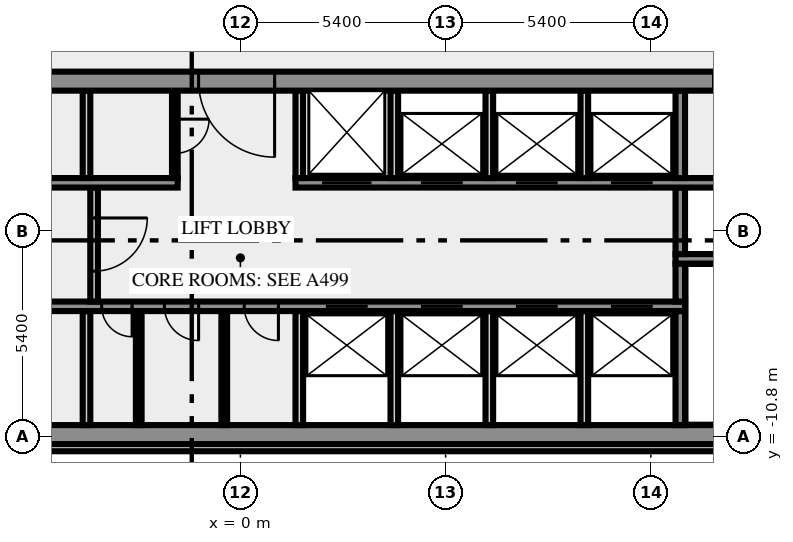
"""IFC4 building model, lengths in metres.
Left out: names, types, materials, properties, quantities, classifications, styles, units other than length and angle.
Written with IfcOpenShell. Run it as: python <this file> out.ifc"""

import sys

from ifc_helpers import new_model, si_unit, direction, frame, frame_2d, origin, place, context, subcontext, project, spatial, rectangle, extrude, element, fill, save


model = new_model("IFC4")
c1 = context("Model", 3, precision=1e-05, world=origin(), true_north=direction((0.0, 1.0)))
c2 = subcontext(c1, "Body", "Model", "MODEL_VIEW")
j1 = project(units=[si_unit("LENGTHUNIT", "METRE"), si_unit("PLANEANGLEUNIT", "RADIAN")], contexts=[c1])
p1 = place(None, origin())
s1 = spatial("IfcSite", under=j1, at=p1, CompositionType="ELEMENT")
p2 = place(p1, origin())
s2 = spatial("IfcBuilding", under=s1, at=p2, CompositionType="ELEMENT")
p3 = place(p2, frame((0.0, 0.0, 230.0)))
s3 = spatial("IfcBuildingStorey", under=s2, at=p3, CompositionType="ELEMENT", Elevation=230.0)
p4 = place(p3, frame((-17.444, -11.088, 0.0), z_axis=(0.0, 0.0, 1.0), x_axis=(1.0, 0.0, 0.0)))
e1 = element("IfcWall", 1, at=p4, inside=s3, PredefinedType="SOLIDWALL", context=c2, shape_type="SweptSolid", body=[
    extrude(rectangle(XDim=34.888, YDim=0.2, at=frame_2d((17.444, 0.0))), origin(), (0.0, 0.0, 1.0), 3.65),
])
p5 = place(p3, frame((-20.0, -10.75, 0.0), z_axis=(0.0, 0.0, 1.0), x_axis=(1.0, 0.0, 0.0)))
e2 = element("IfcWall", 2, at=p5, inside=s3, PredefinedType="SHEAR", context=c2, shape_type="SweptSolid", body=[
    extrude(rectangle(XDim=40.0, YDim=0.5, at=frame_2d((20.0, 0.0))), origin(), (0.0, 0.0, 1.0), 3.65),
])
p6 = place(p5, frame((0.8, 0.0, 1.0)))
e3 = element("IfcOpeningElement", 3, at=p6, cuts=e2, PredefinedType="OPENING", context=c2, shape_type="SweptSolid", body=[
    extrude(rectangle(XDim=1.2, YDim=1.2, at=frame_2d((0.6, 0.6))), frame((0.0, 0.26, 0.0), z_axis=(0.0, -1.0, 0.0), x_axis=(1.0, 0.0, 0.0)), (0.0, 0.0, 1.0), 0.52),
])
p7 = place(p5, frame((38.0, 0.0, 1.0)))
e4 = element("IfcOpeningElement", 4, at=p7, cuts=e2, PredefinedType="OPENING", context=c2, shape_type="SweptSolid", body=[
    extrude(rectangle(XDim=1.2, YDim=1.2, at=frame_2d((0.6, 0.6))), frame((0.0, 0.26, 0.0), z_axis=(0.0, -1.0, 0.0), x_axis=(1.0, 0.0, 0.0)), (0.0, 0.0, 1.0), 0.52),
])
p8 = place(p3, frame((-4.05, -10.5, 0.0), z_axis=(0.0, 0.0, 1.0), x_axis=(0.0, 1.0, 0.0)))
e5 = element("IfcWall", 5, at=p8, inside=s3, PredefinedType="SOLIDWALL", context=c2, shape_type="SweptSolid", body=[
    extrude(rectangle(XDim=3.0, YDim=0.2, at=frame_2d((1.5, 0.0))), origin(), (0.0, 0.0, 1.0), 3.65),
])
for number, where, z_axis, x_axis in (
    (6, (-2.675, -10.5, 0.0), (0.0, 0.0, 1.0), (0.0, 1.0, 0.0)),
    (7, (-0.425, -10.5, 0.0), (0.0, 0.0, 1.0), (0.0, 1.0, 0.0)),
):
    element("IfcWall", number, at=place(p3, frame(where, z_axis=z_axis, x_axis=x_axis)), inside=s3, PredefinedType="PARTITIONING", context=c2, shape_type="SweptSolid", body=[
        extrude(rectangle(XDim=3.0, YDim=0.15, at=frame_2d((1.5, 0.0))), origin(), (0.0, 0.0, 1.0), 3.65),
    ])
for number, where, z_axis, x_axis in (
    (8, (1.55, -10.5, 0.0), (0.0, 0.0, 1.0), (0.0, 1.0, 0.0)),
    (9, (4.05, -10.5, 0.0), (0.0, 0.0, 1.0), (0.0, 1.0, 0.0)),
    (10, (6.55, -10.5, 0.0), (0.0, 0.0, 1.0), (0.0, 1.0, 0.0)),
    (11, (9.05, -10.5, 0.0), (0.0, 0.0, 1.0), (0.0, 1.0, 0.0)),
):
    element("IfcWall", number, at=place(p3, frame(where, z_axis=z_axis, x_axis=x_axis)), inside=s3, PredefinedType="SOLIDWALL", context=c2, shape_type="SweptSolid", body=[
        extrude(rectangle(XDim=3.0, YDim=0.2, at=frame_2d((1.5, 0.0))), origin(), (0.0, 0.0, 1.0), 3.65),
    ])
p9 = place(p3, frame((11.575, -10.5, 0.0), z_axis=(0.0, 0.0, 1.0), x_axis=(0.0, 1.0, 0.0)))
e12 = element("IfcWall", 12, at=p9, inside=s3, PredefinedType="SHEAR", context=c2, shape_type="SweptSolid", body=[
    extrude(rectangle(XDim=3.0, YDim=0.25, at=frame_2d((1.5, 0.0))), origin(), (0.0, 0.0, 1.0), 3.65),
])
p10 = place(p3, frame((11.7, -7.375, 0.0), z_axis=(0.0, 0.0, 1.0), x_axis=(-1.0, 0.0, 0.0)))
e13 = element("IfcWall", 13, at=p10, inside=s3, PredefinedType="SHEAR", context=c2, shape_type="SweptSolid", body=[
    extrude(rectangle(XDim=23.4, YDim=0.25, at=frame_2d((11.7, 0.0))), origin(), (0.0, 0.0, 1.0), 3.65),
])
p11 = place(p10, frame((19.05, 0.0, 0.0)))
e14 = element("IfcOpeningElement", 14, at=p11, cuts=e13, PredefinedType="OPENING", context=c2, shape_type="SweptSolid", body=[
    extrude(rectangle(XDim=0.9, YDim=2.1, at=frame_2d((0.45, 1.05))), frame((0.0, 0.135, 0.0), z_axis=(0.0, -1.0, 0.0), x_axis=(1.0, 0.0, 0.0)), (0.0, 0.0, 1.0), 0.27),
])
p12 = place(p10, frame((14.55, 0.0, 0.0)))
e15 = element("IfcOpeningElement", 15, at=p12, cuts=e13, PredefinedType="OPENING", context=c2, shape_type="SweptSolid", body=[
    extrude(rectangle(XDim=0.8, YDim=2.1, at=frame_2d((0.4, 1.05))), frame((0.0, 0.135, 0.0), z_axis=(0.0, -1.0, 0.0), x_axis=(1.0, 0.0, 0.0)), (0.0, 0.0, 1.0), 0.27),
])
p13 = place(p10, frame((12.8, 0.0, 0.0)))
e16 = element("IfcOpeningElement", 16, at=p13, cuts=e13, PredefinedType="OPENING", context=c2, shape_type="SweptSolid", body=[
    extrude(rectangle(XDim=0.9, YDim=2.1, at=frame_2d((0.45, 1.05))), frame((0.0, 0.135, 0.0), z_axis=(0.0, -1.0, 0.0), x_axis=(1.0, 0.0, 0.0)), (0.0, 0.0, 1.0), 0.27),
])
p14 = place(p10, frame((10.7, 0.0, 0.0)))
e17 = element("IfcOpeningElement", 17, at=p14, cuts=e13, PredefinedType="OPENING", context=c2, shape_type="SweptSolid", body=[
    extrude(rectangle(XDim=0.9, YDim=2.1, at=frame_2d((0.45, 1.05))), frame((0.0, 0.135, 0.0), z_axis=(0.0, -1.0, 0.0), x_axis=(1.0, 0.0, 0.0)), (0.0, 0.0, 1.0), 0.27),
])
p15 = place(p10, frame((8.35, 0.0, 0.0)))
e18 = element("IfcOpeningElement", 18, at=p15, cuts=e13, PredefinedType="OPENING", context=c2, shape_type="SweptSolid", body=[
    extrude(rectangle(XDim=1.1, YDim=2.1, at=frame_2d((0.55, 1.05))), frame((0.0, 0.135, 0.0), z_axis=(0.0, -1.0, 0.0), x_axis=(1.0, 0.0, 0.0)), (0.0, 0.0, 1.0), 0.27),
])
p16 = place(p10, frame((5.85, 0.0, 0.0)))
e19 = element("IfcOpeningElement", 19, at=p16, cuts=e13, PredefinedType="OPENING", context=c2, shape_type="SweptSolid", body=[
    extrude(rectangle(XDim=1.1, YDim=2.1, at=frame_2d((0.55, 1.05))), frame((0.0, 0.135, 0.0), z_axis=(0.0, -1.0, 0.0), x_axis=(1.0, 0.0, 0.0)), (0.0, 0.0, 1.0), 0.27),
])
p17 = place(p10, frame((3.35, 0.0, 0.0)))
e20 = element("IfcOpeningElement", 20, at=p17, cuts=e13, PredefinedType="OPENING", context=c2, shape_type="SweptSolid", body=[
    extrude(rectangle(XDim=1.1, YDim=2.1, at=frame_2d((0.55, 1.05))), frame((0.0, 0.135, 0.0), z_axis=(0.0, -1.0, 0.0), x_axis=(1.0, 0.0, 0.0)), (0.0, 0.0, 1.0), 0.27),
])
p18 = place(p10, frame((0.85, 0.0, 0.0)))
e21 = element("IfcOpeningElement", 21, at=p18, cuts=e13, PredefinedType="OPENING", context=c2, shape_type="SweptSolid", body=[
    extrude(rectangle(XDim=1.1, YDim=2.1, at=frame_2d((0.55, 1.05))), frame((0.0, 0.135, 0.0), z_axis=(0.0, -1.0, 0.0), x_axis=(1.0, 0.0, 0.0)), (0.0, 0.0, 1.0), 0.27),
])
p19 = place(p3, frame((-3.85, -4.25, 0.0), z_axis=(0.0, 0.0, 1.0), x_axis=(0.0, -1.0, 0.0)))
e22 = element("IfcWall", 22, at=p19, inside=s3, PredefinedType="SOLIDWALL", context=c2, shape_type="SweptSolid", body=[
    extrude(rectangle(XDim=3.0, YDim=0.2, at=frame_2d((1.5, 0.0))), origin(), (0.0, 0.0, 1.0), 3.65),
])
p20 = place(p19, frame((0.8, 0.0, 0.0)))
e23 = element("IfcOpeningElement", 23, at=p20, cuts=e22, PredefinedType="OPENING", context=c2, shape_type="SweptSolid", body=[
    extrude(rectangle(XDim=1.4, YDim=2.1, at=frame_2d((0.7, 1.05))), frame((0.0, 0.11, 0.0), z_axis=(0.0, -1.0, 0.0), x_axis=(1.0, 0.0, 0.0)), (0.0, 0.0, 1.0), 0.22),
])
p21 = place(p3, frame((11.575, -7.25, 0.0), z_axis=(0.0, 0.0, 1.0), x_axis=(0.0, 1.0, 0.0)))
e24 = element("IfcWall", 24, at=p21, inside=s3, PredefinedType="SHEAR", context=c2, shape_type="SweptSolid", body=[
    extrude(rectangle(XDim=1.0, YDim=0.25, at=frame_2d((0.5, 0.0))), origin(), (0.0, 0.0, 1.0), 3.65),
])
p22 = place(p3, frame((19.5, -6.125, 0.0), z_axis=(0.0, 0.0, 1.0), x_axis=(-1.0, 0.0, 0.0)))
e25 = element("IfcWall", 25, at=p22, inside=s3, PredefinedType="SHEAR", context=c2, shape_type="SweptSolid", body=[
    extrude(rectangle(XDim=8.05, YDim=0.25, at=frame_2d((4.025, 0.0))), origin(), (0.0, 0.0, 1.0), 3.65),
])
p23 = place(p22, frame((0.05, 0.0, 0.0)))
e26 = element("IfcOpeningElement", 26, at=p23, cuts=e25, PredefinedType="OPENING", context=c2, shape_type="SweptSolid", body=[
    extrude(rectangle(XDim=1.8, YDim=2.1, at=frame_2d((0.9, 1.05))), frame((0.0, 0.135, 0.0), z_axis=(0.0, -1.0, 0.0), x_axis=(1.0, 0.0, 0.0)), (0.0, 0.0, 1.0), 0.27),
])
p24 = place(p3, frame((11.575, -6.0, 0.0), z_axis=(0.0, 0.0, 1.0), x_axis=(0.0, 1.0, 0.0)))
e27 = element("IfcWall", 27, at=p24, inside=s3, PredefinedType="SHEAR", context=c2, shape_type="SweptSolid", body=[
    extrude(rectangle(XDim=1.75, YDim=0.25, at=frame_2d((0.875, 0.0))), origin(), (0.0, 0.0, 1.0), 3.65),
])
p25 = place(p3, frame((-14.35, -4.125, 0.0), z_axis=(0.0, 0.0, 1.0), x_axis=(1.0, 0.0, 0.0)))
e28 = element("IfcWall", 28, at=p25, inside=s3, PredefinedType="SHEAR", context=c2, shape_type="SweptSolid", body=[
    extrude(rectangle(XDim=12.7, YDim=0.25, at=frame_2d((6.35, 0.0))), origin(), (0.0, 0.0, 1.0), 3.65),
])
p26 = place(p3, frame((1.45, -4.125, 0.0), z_axis=(0.0, 0.0, 1.0), x_axis=(1.0, 0.0, 0.0)))
e29 = element("IfcWall", 29, at=p26, inside=s3, PredefinedType="SHEAR", context=c2, shape_type="SweptSolid", body=[
    extrude(rectangle(XDim=12.9, YDim=0.25, at=frame_2d((6.45, 0.0))), origin(), (0.0, 0.0, 1.0), 3.65),
])
p27 = place(p26, frame((0.7, 0.0, 0.0)))
e30 = element("IfcOpeningElement", 30, at=p27, cuts=e29, PredefinedType="OPENING", context=c2, shape_type="SweptSolid", body=[
    extrude(rectangle(XDim=1.3, YDim=2.1, at=frame_2d((0.65, 1.05))), frame((0.0, 0.135, 0.0), z_axis=(0.0, -1.0, 0.0), x_axis=(1.0, 0.0, 0.0)), (0.0, 0.0, 1.0), 0.27),
])
p28 = place(p26, frame((3.3, 0.0, 0.0)))
e31 = element("IfcOpeningElement", 31, at=p28, cuts=e29, PredefinedType="OPENING", context=c2, shape_type="SweptSolid", body=[
    extrude(rectangle(XDim=1.1, YDim=2.1, at=frame_2d((0.55, 1.05))), frame((0.0, 0.135, 0.0), z_axis=(0.0, -1.0, 0.0), x_axis=(1.0, 0.0, 0.0)), (0.0, 0.0, 1.0), 0.27),
])
p29 = place(p26, frame((5.8, 0.0, 0.0)))
e32 = element("IfcOpeningElement", 32, at=p29, cuts=e29, PredefinedType="OPENING", context=c2, shape_type="SweptSolid", body=[
    extrude(rectangle(XDim=1.1, YDim=2.1, at=frame_2d((0.55, 1.05))), frame((0.0, 0.135, 0.0), z_axis=(0.0, -1.0, 0.0), x_axis=(1.0, 0.0, 0.0)), (0.0, 0.0, 1.0), 0.27),
])
p30 = place(p26, frame((8.3, 0.0, 0.0)))
e33 = element("IfcOpeningElement", 33, at=p30, cuts=e29, PredefinedType="OPENING", context=c2, shape_type="SweptSolid", body=[
    extrude(rectangle(XDim=1.1, YDim=2.1, at=frame_2d((0.55, 1.05))), frame((0.0, 0.135, 0.0), z_axis=(0.0, -1.0, 0.0), x_axis=(1.0, 0.0, 0.0)), (0.0, 0.0, 1.0), 0.27),
])
p31 = place(p3, frame((-4.05, -4.0, 0.0), z_axis=(0.0, 0.0, 1.0), x_axis=(0.0, 1.0, 0.0)))
e34 = element("IfcWall", 34, at=p31, inside=s3, PredefinedType="SOLIDWALL", context=c2, shape_type="SweptSolid", body=[
    extrude(rectangle(XDim=2.3, YDim=0.2, at=frame_2d((1.15, 0.0))), origin(), (0.0, 0.0, 1.0), 3.65),
])
p32 = place(p3, frame((-1.725, -1.7, 0.0), z_axis=(0.0, 0.0, 1.0), x_axis=(0.0, -1.0, 0.0)))
e35 = element("IfcWall", 35, at=p32, inside=s3, PredefinedType="PARTITIONING", context=c2, shape_type="SweptSolid", body=[
    extrude(rectangle(XDim=2.3, YDim=0.15, at=frame_2d((1.15, 0.0))), origin(), (0.0, 0.0, 1.0), 3.65),
])
p33 = place(p32, frame((0.75, 0.0, 0.0)))
e36 = element("IfcOpeningElement", 36, at=p33, cuts=e35, PredefinedType="OPENING", context=c2, shape_type="SweptSolid", body=[
    extrude(rectangle(XDim=0.9, YDim=2.1, at=frame_2d((0.45, 1.05))), frame((0.0, 0.085, 0.0), z_axis=(0.0, -1.0, 0.0), x_axis=(1.0, 0.0, 0.0)), (0.0, 0.0, 1.0), 0.17),
])
for number, where, z_axis, x_axis in (
    (37, (1.55, -4.0, 0.0), (0.0, 0.0, 1.0), (0.0, 1.0, 0.0)),
    (38, (4.05, -4.0, 0.0), (0.0, 0.0, 1.0), (0.0, 1.0, 0.0)),
    (39, (6.55, -4.0, 0.0), (0.0, 0.0, 1.0), (0.0, 1.0, 0.0)),
    (40, (9.05, -4.0, 0.0), (0.0, 0.0, 1.0), (0.0, 1.0, 0.0)),
):
    element("IfcWall", number, at=place(p3, frame(where, z_axis=z_axis, x_axis=x_axis)), inside=s3, PredefinedType="SOLIDWALL", context=c2, shape_type="SweptSolid", body=[
        extrude(rectangle(XDim=2.3, YDim=0.2, at=frame_2d((1.15, 0.0))), origin(), (0.0, 0.0, 1.0), 3.65),
    ])
p34 = place(p3, frame((11.575, -4.0, 0.0), z_axis=(0.0, 0.0, 1.0), x_axis=(0.0, 1.0, 0.0)))
e41 = element("IfcWall", 41, at=p34, inside=s3, PredefinedType="SHEAR", context=c2, shape_type="SweptSolid", body=[
    extrude(rectangle(XDim=2.3, YDim=0.25, at=frame_2d((1.15, 0.0))), origin(), (0.0, 0.0, 1.0), 3.65),
])
p35 = place(p3, frame((20.49, -1.45, 0.0), z_axis=(0.0, 0.0, 1.0), x_axis=(-1.0, 0.0, 0.0)))
e42 = element("IfcWall", 42, at=p35, inside=s3, PredefinedType="SHEAR", context=c2, shape_type="SweptSolid", body=[
    extrude(rectangle(XDim=40.98, YDim=0.5, at=frame_2d((20.49, 0.0))), origin(), (0.0, 0.0, 1.0), 3.65),
])
p36 = place(p35, frame((38.14, 0.0, 0.0)))
e43 = element("IfcOpeningElement", 43, at=p36, cuts=e42, PredefinedType="OPENING", context=c2, shape_type="SweptSolid", body=[
    extrude(rectangle(XDim=1.8, YDim=2.1, at=frame_2d((0.9, 1.05))), frame((0.0, 0.26, 0.0), z_axis=(0.0, -1.0, 0.0), x_axis=(1.0, 0.0, 0.0)), (0.0, 0.0, 1.0), 0.52),
])
p37 = place(p35, frame((36.728, 0.0, 0.0)))
e44 = element("IfcOpeningElement", 44, at=p37, cuts=e42, PredefinedType="OPENING", context=c2, shape_type="SweptSolid", body=[
    extrude(rectangle(XDim=0.8, YDim=2.1, at=frame_2d((0.4, 1.05))), frame((0.0, 0.26, 0.0), z_axis=(0.0, -1.0, 0.0), x_axis=(1.0, 0.0, 0.0)), (0.0, 0.0, 1.0), 0.52),
])
p38 = place(p35, frame((35.153, 0.0, 0.0)))
e45 = element("IfcOpeningElement", 45, at=p38, cuts=e42, PredefinedType="OPENING", context=c2, shape_type="SweptSolid", body=[
    extrude(rectangle(XDim=0.8, YDim=2.1, at=frame_2d((0.4, 1.05))), frame((0.0, 0.26, 0.0), z_axis=(0.0, -1.0, 0.0), x_axis=(1.0, 0.0, 0.0)), (0.0, 0.0, 1.0), 0.52),
])
p39 = place(p35, frame((32.94, 0.0, 0.0)))
e46 = element("IfcOpeningElement", 46, at=p39, cuts=e42, PredefinedType="OPENING", context=c2, shape_type="SweptSolid", body=[
    extrude(rectangle(XDim=0.9, YDim=2.1, at=frame_2d((0.45, 1.05))), frame((0.0, 0.26, 0.0), z_axis=(0.0, -1.0, 0.0), x_axis=(1.0, 0.0, 0.0)), (0.0, 0.0, 1.0), 0.52),
])
p40 = place(p35, frame((29.603, 0.0, 0.0)))
e47 = element("IfcOpeningElement", 47, at=p40, cuts=e42, PredefinedType="OPENING", context=c2, shape_type="SweptSolid", body=[
    extrude(rectangle(XDim=0.9, YDim=2.1, at=frame_2d((0.45, 1.05))), frame((0.0, 0.26, 0.0), z_axis=(0.0, -1.0, 0.0), x_axis=(1.0, 0.0, 0.0)), (0.0, 0.0, 1.0), 0.52),
])
p41 = place(p35, frame((25.877, 0.0, 0.0)))
e48 = element("IfcOpeningElement", 48, at=p41, cuts=e42, PredefinedType="OPENING", context=c2, shape_type="SweptSolid", body=[
    extrude(rectangle(XDim=0.9, YDim=2.1, at=frame_2d((0.45, 1.05))), frame((0.0, 0.26, 0.0), z_axis=(0.0, -1.0, 0.0), x_axis=(1.0, 0.0, 0.0)), (0.0, 0.0, 1.0), 0.52),
])
p42 = place(p35, frame((19.59, 0.0, 0.0)))
e49 = element("IfcOpeningElement", 49, at=p42, cuts=e42, PredefinedType="OPENING", context=c2, shape_type="SweptSolid", body=[
    extrude(rectangle(XDim=2.0, YDim=2.1, at=frame_2d((1.0, 1.05))), frame((0.0, 0.26, 0.0), z_axis=(0.0, -1.0, 0.0), x_axis=(1.0, 0.0, 0.0)), (0.0, 0.0, 1.0), 0.52),
])
p43 = place(p35, frame((7.14, 0.0, 0.0)))
e50 = element("IfcOpeningElement", 50, at=p43, cuts=e42, PredefinedType="OPENING", context=c2, shape_type="SweptSolid", body=[
    extrude(rectangle(XDim=0.9, YDim=2.1, at=frame_2d((0.45, 1.05))), frame((0.0, 0.26, 0.0), z_axis=(0.0, -1.0, 0.0), x_axis=(1.0, 0.0, 0.0)), (0.0, 0.0, 1.0), 0.52),
])
p44 = place(p35, frame((4.19, 0.0, 0.0)))
e51 = element("IfcOpeningElement", 51, at=p44, cuts=e42, PredefinedType="OPENING", context=c2, shape_type="SweptSolid", body=[
    extrude(rectangle(XDim=0.9, YDim=2.1, at=frame_2d((0.45, 1.05))), frame((0.0, 0.26, 0.0), z_axis=(0.0, -1.0, 0.0), x_axis=(1.0, 0.0, 0.0)), (0.0, 0.0, 1.0), 0.52),
])
p45 = place(p35, frame((1.04, 0.0, 0.0)))
e52 = element("IfcOpeningElement", 52, at=p45, cuts=e42, PredefinedType="OPENING", context=c2, shape_type="SweptSolid", body=[
    extrude(rectangle(XDim=1.8, YDim=2.1, at=frame_2d((0.9, 1.05))), frame((0.0, 0.26, 0.0), z_axis=(0.0, -1.0, 0.0), x_axis=(1.0, 0.0, 0.0)), (0.0, 0.0, 1.0), 0.52),
])
p46 = place(p12, origin())
e53 = element("IfcDoor", 53, at=p46, inside=s3, OperationType="SINGLE_SWING_RIGHT", PredefinedType="DOOR", context=c2, shape_type="SweptSolid", body=[
    extrude(rectangle(XDim=0.8, YDim=2.1, at=frame_2d((0.4, 1.05))), frame((0.0, 0.025, 0.0), z_axis=(0.0, -1.0, 0.0), x_axis=(1.0, 0.0, 0.0)), (0.0, 0.0, 1.0), 0.05),
])
fill(e15, e53)
p47 = place(p13, origin())
e54 = element("IfcDoor", 54, at=p47, inside=s3, OperationType="SINGLE_SWING_RIGHT", PredefinedType="DOOR", context=c2, shape_type="SweptSolid", body=[
    extrude(rectangle(XDim=0.9, YDim=2.1, at=frame_2d((0.45, 1.05))), frame((0.0, 0.025, 0.0), z_axis=(0.0, -1.0, 0.0), x_axis=(1.0, 0.0, 0.0)), (0.0, 0.0, 1.0), 0.05),
])
fill(e16, e54)
p48 = place(p14, origin())
e55 = element("IfcDoor", 55, at=p48, inside=s3, OperationType="SINGLE_SWING_LEFT", PredefinedType="DOOR", context=c2, shape_type="SweptSolid", body=[
    extrude(rectangle(XDim=0.9, YDim=2.1, at=frame_2d((0.45, 1.05))), frame((0.0, 0.025, 0.0), z_axis=(0.0, -1.0, 0.0), x_axis=(1.0, 0.0, 0.0)), (0.0, 0.0, 1.0), 0.05),
])
fill(e17, e55)
p49 = place(p15, origin())
e56 = element("IfcDoor", 56, at=p49, inside=s3, OperationType="DOUBLE_DOOR_SLIDING", PredefinedType="DOOR", context=c2, shape_type="SweptSolid", body=[
    extrude(rectangle(XDim=1.1, YDim=2.1, at=frame_2d((0.55, 1.05))), frame((0.0, 0.025, 0.0), z_axis=(0.0, -1.0, 0.0), x_axis=(1.0, 0.0, 0.0)), (0.0, 0.0, 1.0), 0.05),
])
fill(e18, e56)
p50 = place(p16, origin())
e57 = element("IfcDoor", 57, at=p50, inside=s3, OperationType="DOUBLE_DOOR_SLIDING", PredefinedType="DOOR", context=c2, shape_type="SweptSolid", body=[
    extrude(rectangle(XDim=1.1, YDim=2.1, at=frame_2d((0.55, 1.05))), frame((0.0, 0.025, 0.0), z_axis=(0.0, -1.0, 0.0), x_axis=(1.0, 0.0, 0.0)), (0.0, 0.0, 1.0), 0.05),
])
fill(e19, e57)
p51 = place(p17, origin())
e58 = element("IfcDoor", 58, at=p51, inside=s3, OperationType="DOUBLE_DOOR_SLIDING", PredefinedType="DOOR", context=c2, shape_type="SweptSolid", body=[
    extrude(rectangle(XDim=1.1, YDim=2.1, at=frame_2d((0.55, 1.05))), frame((0.0, 0.025, 0.0), z_axis=(0.0, -1.0, 0.0), x_axis=(1.0, 0.0, 0.0)), (0.0, 0.0, 1.0), 0.05),
])
fill(e20, e58)
p52 = place(p18, origin())
e59 = element("IfcDoor", 59, at=p52, inside=s3, OperationType="DOUBLE_DOOR_SLIDING", PredefinedType="DOOR", context=c2, shape_type="SweptSolid", body=[
    extrude(rectangle(XDim=1.1, YDim=2.1, at=frame_2d((0.55, 1.05))), frame((0.0, 0.025, 0.0), z_axis=(0.0, -1.0, 0.0), x_axis=(1.0, 0.0, 0.0)), (0.0, 0.0, 1.0), 0.05),
])
fill(e21, e59)
p53 = place(p20, origin())
e60 = element("IfcDoor", 60, at=p53, inside=s3, OperationType="DOUBLE_DOOR_SINGLE_SWING", PredefinedType="DOOR", context=c2, shape_type="SweptSolid", body=[
    extrude(rectangle(XDim=1.4, YDim=2.1, at=frame_2d((0.7, 1.05))), frame((0.0, 0.025, 0.0), z_axis=(0.0, -1.0, 0.0), x_axis=(1.0, 0.0, 0.0)), (0.0, 0.0, 1.0), 0.05),
])
fill(e23, e60)
p54 = place(p27, origin())
e61 = element("IfcDoor", 61, at=p54, inside=s3, OperationType="DOUBLE_DOOR_SLIDING", PredefinedType="DOOR", context=c2, shape_type="SweptSolid", body=[
    extrude(rectangle(XDim=1.3, YDim=2.1, at=frame_2d((0.65, 1.05))), frame((0.0, 0.025, 0.0), z_axis=(0.0, -1.0, 0.0), x_axis=(1.0, 0.0, 0.0)), (0.0, 0.0, 1.0), 0.05),
])
fill(e30, e61)
p55 = place(p28, origin())
e62 = element("IfcDoor", 62, at=p55, inside=s3, OperationType="DOUBLE_DOOR_SLIDING", PredefinedType="DOOR", context=c2, shape_type="SweptSolid", body=[
    extrude(rectangle(XDim=1.1, YDim=2.1, at=frame_2d((0.55, 1.05))), frame((0.0, 0.025, 0.0), z_axis=(0.0, -1.0, 0.0), x_axis=(1.0, 0.0, 0.0)), (0.0, 0.0, 1.0), 0.05),
])
fill(e31, e62)
p56 = place(p29, origin())
e63 = element("IfcDoor", 63, at=p56, inside=s3, OperationType="DOUBLE_DOOR_SLIDING", PredefinedType="DOOR", context=c2, shape_type="SweptSolid", body=[
    extrude(rectangle(XDim=1.1, YDim=2.1, at=frame_2d((0.55, 1.05))), frame((0.0, 0.025, 0.0), z_axis=(0.0, -1.0, 0.0), x_axis=(1.0, 0.0, 0.0)), (0.0, 0.0, 1.0), 0.05),
])
fill(e32, e63)
p57 = place(p30, origin())
e64 = element("IfcDoor", 64, at=p57, inside=s3, OperationType="DOUBLE_DOOR_SLIDING", PredefinedType="DOOR", context=c2, shape_type="SweptSolid", body=[
    extrude(rectangle(XDim=1.1, YDim=2.1, at=frame_2d((0.55, 1.05))), frame((0.0, 0.025, 0.0), z_axis=(0.0, -1.0, 0.0), x_axis=(1.0, 0.0, 0.0)), (0.0, 0.0, 1.0), 0.05),
])
fill(e33, e64)
p58 = place(p33, origin())
e65 = element("IfcDoor", 65, at=p58, inside=s3, OperationType="SINGLE_SWING_RIGHT", PredefinedType="DOOR", context=c2, shape_type="SweptSolid", body=[
    extrude(rectangle(XDim=0.9, YDim=2.1, at=frame_2d((0.45, 1.05))), frame((0.0, 0.025, 0.0), z_axis=(0.0, -1.0, 0.0), x_axis=(1.0, 0.0, 0.0)), (0.0, 0.0, 1.0), 0.05),
])
fill(e36, e65)
p59 = place(p42, origin())
e66 = element("IfcDoor", 66, at=p59, inside=s3, OperationType="DOUBLE_DOOR_SINGLE_SWING", PredefinedType="DOOR", context=c2, shape_type="SweptSolid", body=[
    extrude(rectangle(XDim=2.0, YDim=2.1, at=frame_2d((1.0, 1.05))), frame((0.0, 0.025, 0.0), z_axis=(0.0, -1.0, 0.0), x_axis=(1.0, 0.0, 0.0)), (0.0, 0.0, 1.0), 0.05),
])
fill(e49, e66)
save(model, sys.argv[1])
